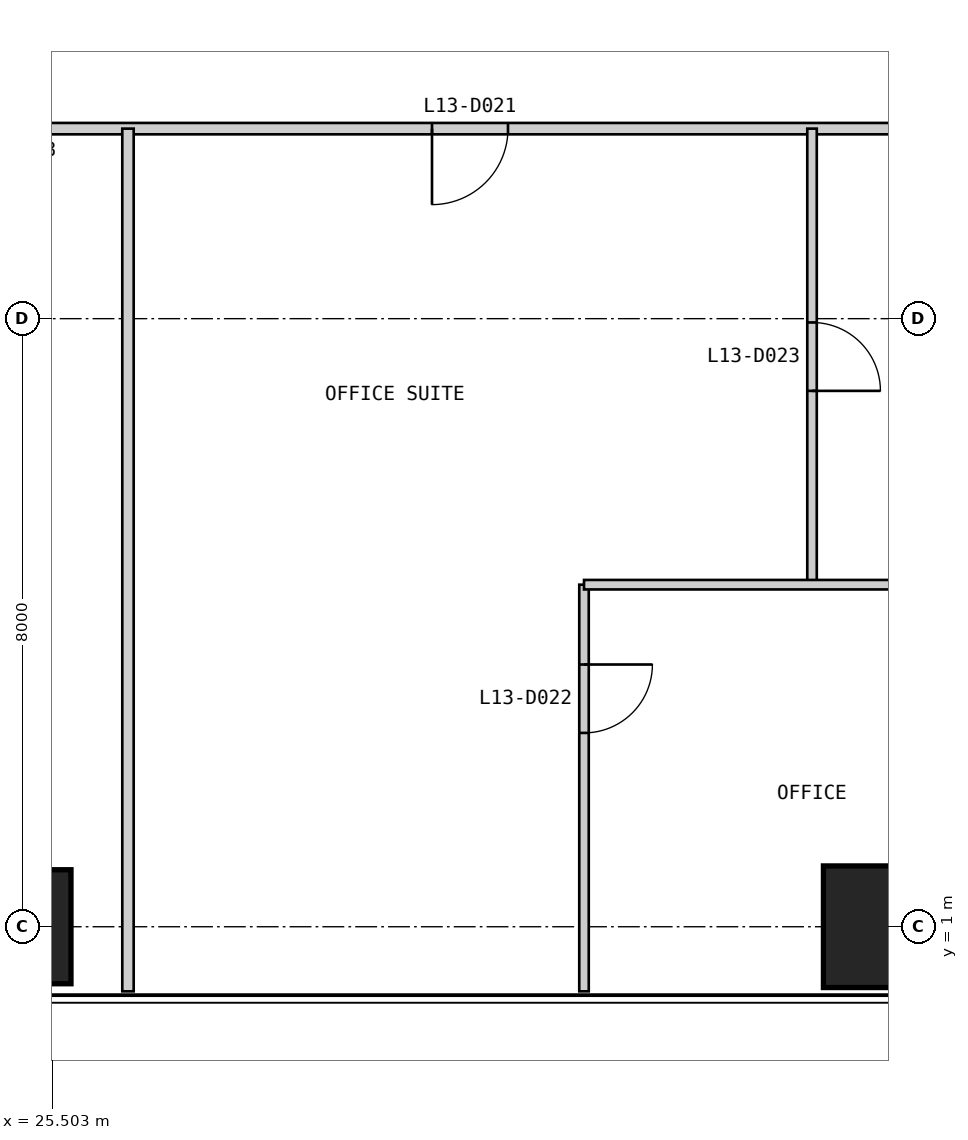
"""IFC4 building model, lengths in metres.
Left out: names, types, materials, properties, quantities, classifications, styles, units other than length and angle.
Written with IfcOpenShell. Run it as: python <this file> out.ifc"""

import sys

from ifc_helpers import new_model, si_unit, direction, frame, frame_2d, origin, origin_2d, place, context, subcontext, project, spatial, rectangle, extrude, element, fill, save


model = new_model("IFC4")
c1 = context("Model", 3, precision=1e-05, world=origin(), true_north=direction((0.0, 1.0)))
c2 = subcontext(c1, "Body", "Model", "MODEL_VIEW")
j1 = project(units=[si_unit("LENGTHUNIT", "METRE"), si_unit("PLANEANGLEUNIT", "RADIAN")], contexts=[c1])
p1 = place(None, origin())
s1 = spatial("IfcSite", under=j1, at=p1, CompositionType="ELEMENT")
p2 = place(p1, origin())
s2 = spatial("IfcBuilding", under=s1, at=p2, CompositionType="ELEMENT")
p3 = place(p2, frame((0.0, 0.0, 59.0)))
s3 = spatial("IfcBuildingStorey", under=s2, at=p3, CompositionType="ELEMENT", Elevation=59.0)
p4 = place(p3, frame((25.0, 1.0, 0.0), z_axis=(0.0, 0.0, 1.0), x_axis=(1.0, 0.0, 0.0)))
e1 = element("IfcColumn", 1, at=p4, inside=s3, PredefinedType="COLUMN", context=c2, shape_type="SweptSolid", body=[
    extrude(rectangle(XDim=1.5, YDim=1.5, at=origin_2d()), origin(), (0.0, 0.0, 1.0), 4.0),
])
p5 = place(p3, frame((37.0, 1.0, 0.0), z_axis=(0.0, 0.0, 1.0), x_axis=(1.0, 0.0, 0.0)))
e2 = element("IfcColumn", 2, at=p5, inside=s3, PredefinedType="COLUMN", context=c2, shape_type="SweptSolid", body=[
    extrude(rectangle(XDim=2.7, YDim=1.6, at=origin_2d()), origin(), (0.0, 0.0, 1.0), 4.0),
])
p6 = place(p3, frame((11.5, 11.5, 0.0), z_axis=(0.0, 0.0, 1.0), x_axis=(1.0, 0.0, 0.0)))
e3 = element("IfcWall", 3, at=p6, inside=s3, PredefinedType="PARTITIONING", context=c2, shape_type="SweptSolid", body=[
    extrude(rectangle(XDim=27.0, YDim=0.15, at=frame_2d((13.5, 0.0))), origin(), (0.0, 0.0, 1.0), 3.85),
])
p7 = place(p6, frame((1.0, 0.0, 0.0)))
e4 = element("IfcOpeningElement", 4, at=p7, cuts=e3, PredefinedType="OPENING", context=c2, shape_type="SweptSolid", body=[
    extrude(rectangle(XDim=1.0, YDim=2.2, at=frame_2d((0.5, 1.1))), frame((0.0, 0.085, 0.0), z_axis=(0.0, -1.0, 0.0), x_axis=(1.0, 0.0, 0.0)), (0.0, 0.0, 1.0), 0.17),
])
p8 = place(p6, frame((5.5, 0.0, 0.0)))
e5 = element("IfcOpeningElement", 5, at=p8, cuts=e3, PredefinedType="OPENING", context=c2, shape_type="SweptSolid", body=[
    extrude(rectangle(XDim=1.0, YDim=2.2, at=frame_2d((0.5, 1.1))), frame((0.0, 0.085, 0.0), z_axis=(0.0, -1.0, 0.0), x_axis=(1.0, 0.0, 0.0)), (0.0, 0.0, 1.0), 0.17),
])
p9 = place(p6, frame((11.5, 0.0, 0.0)))
e6 = element("IfcOpeningElement", 6, at=p9, cuts=e3, PredefinedType="OPENING", context=c2, shape_type="SweptSolid", body=[
    extrude(rectangle(XDim=1.0, YDim=2.2, at=frame_2d((0.5, 1.1))), frame((0.0, 0.085, 0.0), z_axis=(0.0, -1.0, 0.0), x_axis=(1.0, 0.0, 0.0)), (0.0, 0.0, 1.0), 0.17),
])
p10 = place(p6, frame((19.0, 0.0, 0.0)))
e7 = element("IfcOpeningElement", 7, at=p10, cuts=e3, PredefinedType="OPENING", context=c2, shape_type="SweptSolid", body=[
    extrude(rectangle(XDim=1.0, YDim=2.2, at=frame_2d((0.5, 1.1))), frame((0.0, 0.085, 0.0), z_axis=(0.0, -1.0, 0.0), x_axis=(1.0, 0.0, 0.0)), (0.0, 0.0, 1.0), 0.17),
])
p11 = place(p3, frame((26.5, 0.15, 0.0), z_axis=(0.0, 0.0, 1.0), x_axis=(0.0, 1.0, 0.0)))
e8 = element("IfcWall", 8, at=p11, inside=s3, PredefinedType="PARTITIONING", context=c2, shape_type="SweptSolid", body=[
    extrude(rectangle(XDim=11.35, YDim=0.15, at=frame_2d((5.675, 0.0))), origin(), (0.0, 0.0, 1.0), 3.85),
])
p12 = place(p3, frame((32.5, 0.15, 0.0), z_axis=(0.0, 0.0, 1.0), x_axis=(0.0, 1.0, 0.0)))
e9 = element("IfcWall", 9, at=p12, inside=s3, PredefinedType="PARTITIONING", context=c2, shape_type="SweptSolid", body=[
    extrude(rectangle(XDim=5.35, YDim=0.125, at=frame_2d((2.675, 0.0))), origin(), (0.0, 0.0, 1.0), 3.85),
])
p13 = place(p12, frame((3.4, 0.0, 0.0)))
e10 = element("IfcOpeningElement", 10, at=p13, cuts=e9, PredefinedType="OPENING", context=c2, shape_type="SweptSolid", body=[
    extrude(rectangle(XDim=0.9, YDim=2.2, at=frame_2d((0.45, 1.1))), frame((0.0, 0.073, 0.0), z_axis=(0.0, -1.0, 0.0), x_axis=(1.0, 0.0, 0.0)), (0.0, 0.0, 1.0), 0.145),
])
p14 = place(p3, frame((35.5, 5.5, 0.0), z_axis=(0.0, 0.0, 1.0), x_axis=(0.0, 1.0, 0.0)))
e11 = element("IfcWall", 11, at=p14, inside=s3, PredefinedType="PARTITIONING", context=c2, shape_type="SweptSolid", body=[
    extrude(rectangle(XDim=6.0, YDim=0.125, at=frame_2d((3.0, 0.0))), origin(), (0.0, 0.0, 1.0), 3.85),
])
p15 = place(p14, frame((2.55, 0.0, 0.0)))
e12 = element("IfcOpeningElement", 12, at=p15, cuts=e11, PredefinedType="OPENING", context=c2, shape_type="SweptSolid", body=[
    extrude(rectangle(XDim=0.9, YDim=2.2, at=frame_2d((0.45, 1.1))), frame((0.0, 0.073, 0.0), z_axis=(0.0, -1.0, 0.0), x_axis=(1.0, 0.0, 0.0)), (0.0, 0.0, 1.0), 0.145),
])
p16 = place(p3, frame((32.5, 5.5, 0.0), z_axis=(0.0, 0.0, 1.0), x_axis=(1.0, 0.0, 0.0)))
e13 = element("IfcWall", 13, at=p16, inside=s3, PredefinedType="PARTITIONING", context=c2, shape_type="SweptSolid", body=[
    extrude(rectangle(XDim=6.0, YDim=0.125, at=frame_2d((3.0, 0.0))), origin(), (0.0, 0.0, 1.0), 3.85),
])
p17 = place(p10, frame((1.0, 0.0, 0.0), z_axis=(0.0, 0.0, 1.0), x_axis=(-1.0, 0.0, 0.0)))
e14 = element("IfcDoor", 14, at=p17, inside=s3, OperationType="SINGLE_SWING_RIGHT", PredefinedType="DOOR", context=c2, shape_type="SweptSolid", body=[
    extrude(rectangle(XDim=1.0, YDim=2.2, at=frame_2d((0.5, 1.1))), frame((0.0, 0.025, 0.0), z_axis=(0.0, -1.0, 0.0), x_axis=(1.0, 0.0, 0.0)), (0.0, 0.0, 1.0), 0.05),
])
fill(e7, e14)
p18 = place(p13, frame((0.9, 0.0, 0.0), z_axis=(0.0, 0.0, 1.0), x_axis=(-1.0, 0.0, 0.0)))
e15 = element("IfcDoor", 15, at=p18, inside=s3, OperationType="SINGLE_SWING_LEFT", PredefinedType="DOOR", context=c2, shape_type="SweptSolid", body=[
    extrude(rectangle(XDim=0.9, YDim=2.2, at=frame_2d((0.45, 1.1))), frame((0.0, 0.025, 0.0), z_axis=(0.0, -1.0, 0.0), x_axis=(1.0, 0.0, 0.0)), (0.0, 0.0, 1.0), 0.05),
])
fill(e10, e15)
p19 = place(p15, frame((0.9, 0.0, 0.0), z_axis=(0.0, 0.0, 1.0), x_axis=(-1.0, 0.0, 0.0)))
e16 = element("IfcDoor", 16, at=p19, inside=s3, OperationType="SINGLE_SWING_RIGHT", PredefinedType="DOOR", context=c2, shape_type="SweptSolid", body=[
    extrude(rectangle(XDim=0.9, YDim=2.2, at=frame_2d((0.45, 1.1))), frame((0.0, 0.025, 0.0), z_axis=(0.0, -1.0, 0.0), x_axis=(1.0, 0.0, 0.0)), (0.0, 0.0, 1.0), 0.05),
])
fill(e12, e16)
save(model, sys.argv[1])
